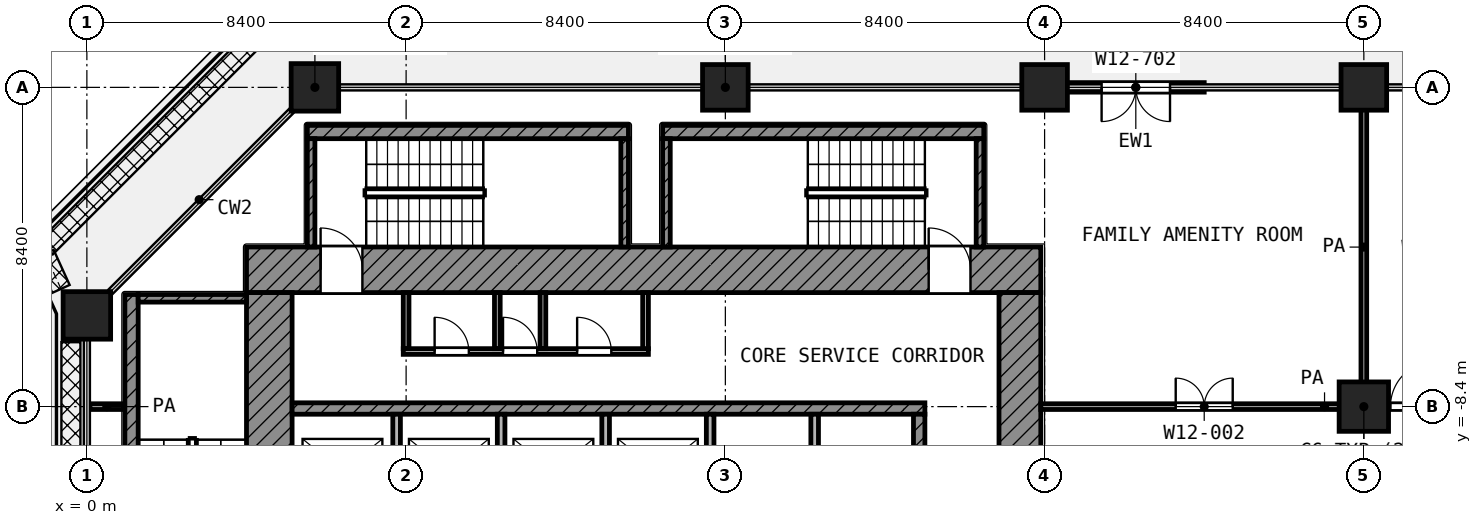
"""IFC4 building model, lengths in metres.
Left out: names, types, materials, properties, quantities, classifications, styles, units other than length and angle.
Written with IfcOpenShell. Run it as: python <this file> out.ifc"""

import sys

from ifc_helpers import new_model, si_unit, direction, frame, frame_2d, origin, origin_2d, place, context, subcontext, project, spatial, rectangle, extrude, element, fill, save


model = new_model("IFC4")
c1 = context("Model", 3, precision=1e-05, world=origin(), true_north=direction((0.0, 1.0)))
c2 = subcontext(c1, "Body", "Model", "MODEL_VIEW")
j1 = project(units=[si_unit("LENGTHUNIT", "METRE"), si_unit("PLANEANGLEUNIT", "RADIAN")], contexts=[c1])
p1 = place(None, origin())
s1 = spatial("IfcSite", under=j1, at=p1, CompositionType="ELEMENT")
p2 = place(p1, origin())
s2 = spatial("IfcBuilding", under=s1, at=p2, CompositionType="ELEMENT")
p3 = place(p2, frame((0.0, 0.0, 77.0)))
s3 = spatial("IfcBuildingStorey", under=s2, at=p3, CompositionType="ELEMENT", Elevation=77.0)
p4 = place(p3, frame((6.0, 0.0, 0.0), z_axis=(0.0, 0.0, 1.0), x_axis=(1.0, 0.0, 0.0)))
e1 = element("IfcColumn", 1, at=p4, inside=s3, PredefinedType="COLUMN", context=c2, shape_type="SweptSolid", body=[
    extrude(rectangle(XDim=1.25, YDim=1.25, at=origin_2d()), origin(), (0.0, 0.0, 1.0), 4.2),
])
for number, where, z_axis, x_axis in (
    (2, (16.8, 0.0, 0.0), (0.0, 0.0, 1.0), (1.0, 0.0, 0.0)),
    (3, (25.2, 0.0, 0.0), (0.0, 0.0, 1.0), (1.0, 0.0, 0.0)),
    (4, (33.6, 0.0, 0.0), (0.0, 0.0, 1.0), (1.0, 0.0, 0.0)),
):
    element("IfcColumn", number, at=place(p3, frame(where, z_axis=z_axis, x_axis=x_axis)), inside=s3, PredefinedType="COLUMN", context=c2, shape_type="SweptSolid", body=[
        extrude(rectangle(XDim=1.2, YDim=1.2, at=origin_2d()), origin(), (0.0, 0.0, 1.0), 4.2),
    ])
p5 = place(p3, frame((0.0, -6.0, 0.0), z_axis=(0.0, 0.0, 1.0), x_axis=(1.0, 0.0, 0.0)))
e5 = element("IfcColumn", 5, at=p5, inside=s3, PredefinedType="COLUMN", context=c2, shape_type="SweptSolid", body=[
    extrude(rectangle(XDim=1.25, YDim=1.25, at=origin_2d()), origin(), (0.0, 0.0, 1.0), 4.2),
])
p6 = place(p3, frame((33.6, -8.4, 0.0), z_axis=(0.0, 0.0, 1.0), x_axis=(1.0, 0.0, 0.0)))
e6 = element("IfcColumn", 6, at=p6, inside=s3, PredefinedType="COLUMN", context=c2, shape_type="SweptSolid", body=[
    extrude(rectangle(XDim=1.3, YDim=1.3, at=origin_2d()), origin(), (0.0, 0.0, 1.0), 4.2),
])
p7 = place(p3, frame((29.4, 0.0, 0.0), z_axis=(0.0, 0.0, 1.0), x_axis=(-1.0, 0.0, 0.0)))
e7 = element("IfcWall", 7, at=p7, inside=s3, PredefinedType="SOLIDWALL", context=c2, shape_type="SweptSolid", body=[
    extrude(rectangle(XDim=3.6, YDim=0.25, at=frame_2d((1.8, 0.0))), origin(), (0.0, 0.0, 1.0), 3.78),
])
p8 = place(p7, frame((0.9, 0.0, 0.0)))
e8 = element("IfcOpeningElement", 8, at=p8, cuts=e7, PredefinedType="OPENING", context=c2, shape_type="SweptSolid", body=[
    extrude(rectangle(XDim=1.8, YDim=2.1, at=frame_2d((0.9, 1.05))), frame((0.0, 0.135, 0.0), z_axis=(0.0, -1.0, 0.0), x_axis=(1.0, 0.0, 0.0)), (0.0, 0.0, 1.0), 0.27),
])
p9 = place(p3, frame((4.2, -4.8, 0.0), z_axis=(0.0, 0.0, 1.0), x_axis=(1.0, 0.0, 0.0)))
e9 = element("IfcWall", 9, at=p9, inside=s3, PredefinedType="SHEAR", context=c2, shape_type="SweptSolid", body=[
    extrude(rectangle(XDim=20.9, YDim=1.2, at=frame_2d((10.45, 0.0))), origin(), (0.0, 0.0, 1.0), 3.9),
])
p10 = place(p9, frame((1.95, 0.0, 0.0)))
e10 = element("IfcOpeningElement", 10, at=p10, cuts=e9, PredefinedType="OPENING", context=c2, shape_type="SweptSolid", body=[
    extrude(rectangle(XDim=1.1, YDim=2.1, at=frame_2d((0.55, 1.05))), frame((0.0, 0.61, 0.0), z_axis=(0.0, -1.0, 0.0), x_axis=(1.0, 0.0, 0.0)), (0.0, 0.0, 1.0), 1.22),
])
p11 = place(p9, frame((17.95, 0.0, 0.0)))
e11 = element("IfcOpeningElement", 11, at=p11, cuts=e9, PredefinedType="OPENING", context=c2, shape_type="SweptSolid", body=[
    extrude(rectangle(XDim=1.1, YDim=2.1, at=frame_2d((0.55, 1.05))), frame((0.0, 0.61, 0.0), z_axis=(0.0, -1.0, 0.0), x_axis=(1.0, 0.0, 0.0)), (0.0, 0.0, 1.0), 1.22),
])
p12 = place(p3, frame((4.8, -25.1, 0.0), z_axis=(0.0, 0.0, 1.0), x_axis=(0.0, 1.0, 0.0)))
e12 = element("IfcWall", 12, at=p12, inside=s3, PredefinedType="SHEAR", context=c2, shape_type="SweptSolid", body=[
    extrude(rectangle(XDim=19.7, YDim=1.2, at=frame_2d((9.85, 0.0))), origin(), (0.0, 0.0, 1.0), 3.9),
])
p13 = place(p12, frame((11.55, 0.0, 0.0)))
e13 = element("IfcOpeningElement", 13, at=p13, cuts=e12, PredefinedType="OPENING", context=c2, shape_type="SweptSolid", body=[
    extrude(rectangle(XDim=1.1, YDim=2.1, at=frame_2d((0.55, 1.05))), frame((0.0, 0.61, 0.0), z_axis=(0.0, -1.0, 0.0), x_axis=(1.0, 0.0, 0.0)), (0.0, 0.0, 1.0), 1.22),
])
p14 = place(p12, frame((2.25, 0.0, 0.0)))
e14 = element("IfcOpeningElement", 14, at=p14, cuts=e12, PredefinedType="OPENING", context=c2, shape_type="SweptSolid", body=[
    extrude(rectangle(XDim=1.1, YDim=2.1, at=frame_2d((0.55, 1.05))), frame((0.0, 0.61, 0.0), z_axis=(0.0, -1.0, 0.0), x_axis=(1.0, 0.0, 0.0)), (0.0, 0.0, 1.0), 1.22),
])
p15 = place(p3, frame((24.55, -24.0, 0.0), z_axis=(0.0, 0.0, 1.0), x_axis=(0.0, 1.0, 0.0)))
e15 = element("IfcWall", 15, at=p15, inside=s3, PredefinedType="SHEAR", context=c2, shape_type="SweptSolid", body=[
    extrude(rectangle(XDim=18.6, YDim=1.1, at=frame_2d((9.3, 0.0))), origin(), (0.0, 0.0, 1.0), 3.9),
])
p16 = place(p15, frame((10.5, 0.0, 0.0)))
e16 = element("IfcOpeningElement", 16, at=p16, cuts=e15, PredefinedType="OPENING", context=c2, shape_type="SweptSolid", body=[
    extrude(rectangle(XDim=1.8, YDim=2.1, at=frame_2d((0.9, 1.05))), frame((0.0, 0.56, 0.0), z_axis=(0.0, -1.0, 0.0), x_axis=(1.0, 0.0, 0.0)), (0.0, 0.0, 1.0), 1.12),
])
p17 = place(p3, frame((5.4, -8.45, 0.0), z_axis=(0.0, 0.0, 1.0), x_axis=(1.0, 0.0, 0.0)))
e17 = element("IfcWall", 17, at=p17, inside=s3, PredefinedType="SHEAR", context=c2, shape_type="SweptSolid", body=[
    extrude(rectangle(XDim=16.65, YDim=0.3, at=frame_2d((8.325, 0.0))), origin(), (0.0, 0.0, 1.0), 3.9),
])
p18 = place(p3, frame((21.9, -10.95, 0.0), z_axis=(0.0, 0.0, 1.0), x_axis=(0.0, 1.0, 0.0)))
e18 = element("IfcWall", 18, at=p18, inside=s3, PredefinedType="SHEAR", context=c2, shape_type="SweptSolid", body=[
    extrude(rectangle(XDim=2.35, YDim=0.3, at=frame_2d((1.175, 0.0))), origin(), (0.0, 0.0, 1.0), 3.9),
])
for number, where, z_axis, x_axis in (
    (19, (8.15, -10.95, 0.0), (0.0, 0.0, 1.0), (0.0, 1.0, 0.0)),
    (20, (10.9, -10.95, 0.0), (0.0, 0.0, 1.0), (0.0, 1.0, 0.0)),
    (21, (13.65, -10.95, 0.0), (0.0, 0.0, 1.0), (0.0, 1.0, 0.0)),
    (22, (16.4, -10.95, 0.0), (0.0, 0.0, 1.0), (0.0, 1.0, 0.0)),
    (23, (19.15, -10.95, 0.0), (0.0, 0.0, 1.0), (0.0, 1.0, 0.0)),
):
    element("IfcWall", number, at=place(p3, frame(where, z_axis=z_axis, x_axis=x_axis)), inside=s3, PredefinedType="PARTITIONING", context=c2, shape_type="SweptSolid", body=[
        extrude(rectangle(XDim=2.35, YDim=0.2, at=frame_2d((1.175, 0.0))), origin(), (0.0, 0.0, 1.0), 3.9),
    ])
p19 = place(p3, frame((8.325, -6.95, 0.0), z_axis=(0.0, 0.0, 1.0), x_axis=(1.0, 0.0, 0.0)))
e24 = element("IfcWall", 24, at=p19, inside=s3, PredefinedType="PARTITIONING", context=c2, shape_type="SweptSolid", body=[
    extrude(rectangle(XDim=6.45, YDim=0.15, at=frame_2d((3.225, 0.0))), origin(), (0.0, 0.0, 1.0), 3.9),
])
p20 = place(p19, frame((0.825, 0.0, 0.0)))
e25 = element("IfcOpeningElement", 25, at=p20, cuts=e24, PredefinedType="OPENING", context=c2, shape_type="SweptSolid", body=[
    extrude(rectangle(XDim=0.9, YDim=2.1, at=frame_2d((0.45, 1.05))), frame((0.0, 0.085, 0.0), z_axis=(0.0, -1.0, 0.0), x_axis=(1.0, 0.0, 0.0)), (0.0, 0.0, 1.0), 0.17),
])
p21 = place(p19, frame((2.625, 0.0, 0.0)))
e26 = element("IfcOpeningElement", 26, at=p21, cuts=e24, PredefinedType="OPENING", context=c2, shape_type="SweptSolid", body=[
    extrude(rectangle(XDim=0.9, YDim=2.1, at=frame_2d((0.45, 1.05))), frame((0.0, 0.085, 0.0), z_axis=(0.0, -1.0, 0.0), x_axis=(1.0, 0.0, 0.0)), (0.0, 0.0, 1.0), 0.17),
])
p22 = place(p19, frame((4.575, 0.0, 0.0)))
e27 = element("IfcOpeningElement", 27, at=p22, cuts=e24, PredefinedType="OPENING", context=c2, shape_type="SweptSolid", body=[
    extrude(rectangle(XDim=0.9, YDim=2.1, at=frame_2d((0.45, 1.05))), frame((0.0, 0.085, 0.0), z_axis=(0.0, -1.0, 0.0), x_axis=(1.0, 0.0, 0.0)), (0.0, 0.0, 1.0), 0.17),
])
for number, where, z_axis, x_axis in (
    (28, (8.4, -6.875, 0.0), (0.0, 0.0, 1.0), (0.0, 1.0, 0.0)),
    (29, (10.8, -6.875, 0.0), (0.0, 0.0, 1.0), (0.0, 1.0, 0.0)),
    (30, (12.0, -6.875, 0.0), (0.0, 0.0, 1.0), (0.0, 1.0, 0.0)),
    (31, (14.7, -6.875, 0.0), (0.0, 0.0, 1.0), (0.0, 1.0, 0.0)),
):
    element("IfcWall", number, at=place(p3, frame(where, z_axis=z_axis, x_axis=x_axis)), inside=s3, PredefinedType="PARTITIONING", context=c2, shape_type="SweptSolid", body=[
        extrude(rectangle(XDim=1.475, YDim=0.15, at=frame_2d((0.738, 0.0))), origin(), (0.0, 0.0, 1.0), 3.9),
    ])
p23 = place(p3, frame((1.175, -13.9, 0.0), z_axis=(0.0, 0.0, 1.0), x_axis=(0.0, 1.0, 0.0)))
e32 = element("IfcWall", 32, at=p23, inside=s3, PredefinedType="SHEAR", context=c2, shape_type="SweptSolid", body=[
    extrude(rectangle(XDim=8.45, YDim=0.35, at=frame_2d((4.225, 0.0))), origin(), (0.0, 0.0, 1.0), 3.9),
])
p24 = place(p3, frame((1.35, -5.55, 0.0), z_axis=(0.0, 0.0, 1.0), x_axis=(1.0, 0.0, 0.0)))
e33 = element("IfcWall", 33, at=p24, inside=s3, PredefinedType="SHEAR", context=c2, shape_type="SweptSolid", body=[
    extrude(rectangle(XDim=2.85, YDim=0.2, at=frame_2d((1.425, 0.0))), origin(), (0.0, 0.0, 1.0), 3.9),
])
p25 = place(p3, frame((5.8, -1.175, 0.0), z_axis=(0.0, 0.0, 1.0), x_axis=(1.0, 0.0, 0.0)))
e34 = element("IfcWall", 34, at=p25, inside=s3, PredefinedType="SHEAR", context=c2, shape_type="SweptSolid", body=[
    extrude(rectangle(XDim=8.45, YDim=0.35, at=frame_2d((4.225, 0.0))), origin(), (0.0, 0.0, 1.0), 3.9),
])
for number, where, z_axis, x_axis in (
    (35, (5.9, -4.2, 0.0), (0.0, 0.0, 1.0), (0.0, 1.0, 0.0)),
    (36, (14.15, -4.2, 0.0), (0.0, 0.0, 1.0), (0.0, 1.0, 0.0)),
):
    element("IfcWall", number, at=place(p3, frame(where, z_axis=z_axis, x_axis=x_axis)), inside=s3, PredefinedType="SHEAR", context=c2, shape_type="SweptSolid", body=[
        extrude(rectangle(XDim=2.85, YDim=0.2, at=frame_2d((1.425, 0.0))), origin(), (0.0, 0.0, 1.0), 3.9),
    ])
p26 = place(p3, frame((15.15, -1.175, 0.0), z_axis=(0.0, 0.0, 1.0), x_axis=(1.0, 0.0, 0.0)))
e37 = element("IfcWall", 37, at=p26, inside=s3, PredefinedType="SHEAR", context=c2, shape_type="SweptSolid", body=[
    extrude(rectangle(XDim=8.45, YDim=0.35, at=frame_2d((4.225, 0.0))), origin(), (0.0, 0.0, 1.0), 3.9),
])
for number, where, z_axis, x_axis in (
    (38, (15.25, -4.2, 0.0), (0.0, 0.0, 1.0), (0.0, 1.0, 0.0)),
    (39, (23.5, -4.2, 0.0), (0.0, 0.0, 1.0), (0.0, 1.0, 0.0)),
):
    element("IfcWall", number, at=place(p3, frame(where, z_axis=z_axis, x_axis=x_axis)), inside=s3, PredefinedType="SHEAR", context=c2, shape_type="SweptSolid", body=[
        extrude(rectangle(XDim=2.85, YDim=0.2, at=frame_2d((1.425, 0.0))), origin(), (0.0, 0.0, 1.0), 3.9),
    ])
p27 = place(p3, frame((0.08, -8.4, 0.0), z_axis=(0.0, 0.0, 1.0), x_axis=(1.0, 0.0, 0.0)))
e40 = element("IfcWall", 40, at=p27, inside=s3, PredefinedType="PARTITIONING", context=c2, shape_type="SweptSolid", body=[
    extrude(rectangle(XDim=0.89, YDim=0.15, at=frame_2d((0.445, 0.0))), origin(), (0.0, 0.0, 1.0), 3.9),
])
p28 = place(p3, frame((25.1, -8.4, 0.0), z_axis=(0.0, 0.0, 1.0), x_axis=(1.0, 0.0, 0.0)))
e41 = element("IfcWall", 41, at=p28, inside=s3, PredefinedType="PARTITIONING", context=c2, shape_type="SweptSolid", body=[
    extrude(rectangle(XDim=14.932, YDim=0.15, at=frame_2d((7.466, 0.0))), origin(), (0.0, 0.0, 1.0), 3.9),
])
p29 = place(p28, frame((3.55, 0.0, 0.0)))
e42 = element("IfcOpeningElement", 42, at=p29, cuts=e41, PredefinedType="OPENING", context=c2, shape_type="SweptSolid", body=[
    extrude(rectangle(XDim=1.5, YDim=2.1, at=frame_2d((0.75, 1.05))), frame((0.0, 0.085, 0.0), z_axis=(0.0, -1.0, 0.0), x_axis=(1.0, 0.0, 0.0)), (0.0, 0.0, 1.0), 0.17),
])
p30 = place(p28, frame((9.2, 0.0, 0.0)))
e43 = element("IfcOpeningElement", 43, at=p30, cuts=e41, PredefinedType="OPENING", context=c2, shape_type="SweptSolid", body=[
    extrude(rectangle(XDim=1.2, YDim=2.1, at=frame_2d((0.6, 1.05))), frame((0.0, 0.085, 0.0), z_axis=(0.0, -1.0, 0.0), x_axis=(1.0, 0.0, 0.0)), (0.0, 0.0, 1.0), 0.17),
])
p31 = place(p3, frame((33.6, -8.325, 0.0), z_axis=(0.0, 0.0, 1.0), x_axis=(0.0, 1.0, 0.0)))
e44 = element("IfcWall", 44, at=p31, inside=s3, PredefinedType="PARTITIONING", context=c2, shape_type="SweptSolid", body=[
    extrude(rectangle(XDim=8.245, YDim=0.15, at=frame_2d((4.123, 0.0))), origin(), (0.0, 0.0, 1.0), 3.9),
])
p32 = place(p8, origin())
e45 = element("IfcDoor", 45, at=p32, inside=s3, OperationType="DOUBLE_DOOR_SINGLE_SWING", PredefinedType="DOOR", context=c2, shape_type="SweptSolid", body=[
    extrude(rectangle(XDim=1.8, YDim=2.1, at=frame_2d((0.9, 1.05))), frame((0.0, 0.025, 0.0), z_axis=(0.0, -1.0, 0.0), x_axis=(1.0, 0.0, 0.0)), (0.0, 0.0, 1.0), 0.05),
])
fill(e8, e45)
p33 = place(p10, origin())
e46 = element("IfcDoor", 46, at=p33, inside=s3, OperationType="SINGLE_SWING_LEFT", PredefinedType="DOOR", context=c2, shape_type="SweptSolid", body=[
    extrude(rectangle(XDim=1.1, YDim=2.1, at=frame_2d((0.55, 1.05))), frame((0.0, 0.025, 0.0), z_axis=(0.0, -1.0, 0.0), x_axis=(1.0, 0.0, 0.0)), (0.0, 0.0, 1.0), 0.05),
])
fill(e10, e46)
p34 = place(p11, origin())
e47 = element("IfcDoor", 47, at=p34, inside=s3, OperationType="SINGLE_SWING_LEFT", PredefinedType="DOOR", context=c2, shape_type="SweptSolid", body=[
    extrude(rectangle(XDim=1.1, YDim=2.1, at=frame_2d((0.55, 1.05))), frame((0.0, 0.025, 0.0), z_axis=(0.0, -1.0, 0.0), x_axis=(1.0, 0.0, 0.0)), (0.0, 0.0, 1.0), 0.05),
])
fill(e11, e47)
p35 = place(p20, origin())
e48 = element("IfcDoor", 48, at=p35, inside=s3, OperationType="SINGLE_SWING_LEFT", PredefinedType="DOOR", context=c2, shape_type="SweptSolid", body=[
    extrude(rectangle(XDim=0.9, YDim=2.1, at=frame_2d((0.45, 1.05))), frame((0.0, 0.025, 0.0), z_axis=(0.0, -1.0, 0.0), x_axis=(1.0, 0.0, 0.0)), (0.0, 0.0, 1.0), 0.05),
])
fill(e25, e48)
p36 = place(p21, origin())
e49 = element("IfcDoor", 49, at=p36, inside=s3, OperationType="SINGLE_SWING_LEFT", PredefinedType="DOOR", context=c2, shape_type="SweptSolid", body=[
    extrude(rectangle(XDim=0.9, YDim=2.1, at=frame_2d((0.45, 1.05))), frame((0.0, 0.025, 0.0), z_axis=(0.0, -1.0, 0.0), x_axis=(1.0, 0.0, 0.0)), (0.0, 0.0, 1.0), 0.05),
])
fill(e26, e49)
p37 = place(p22, origin())
e50 = element("IfcDoor", 50, at=p37, inside=s3, OperationType="SINGLE_SWING_LEFT", PredefinedType="DOOR", context=c2, shape_type="SweptSolid", body=[
    extrude(rectangle(XDim=0.9, YDim=2.1, at=frame_2d((0.45, 1.05))), frame((0.0, 0.025, 0.0), z_axis=(0.0, -1.0, 0.0), x_axis=(1.0, 0.0, 0.0)), (0.0, 0.0, 1.0), 0.05),
])
fill(e27, e50)
p38 = place(p29, origin())
e51 = element("IfcDoor", 51, at=p38, inside=s3, OperationType="DOUBLE_DOOR_SINGLE_SWING", PredefinedType="DOOR", context=c2, shape_type="SweptSolid", body=[
    extrude(rectangle(XDim=1.5, YDim=2.1, at=frame_2d((0.75, 1.05))), frame((0.0, 0.025, 0.0), z_axis=(0.0, -1.0, 0.0), x_axis=(1.0, 0.0, 0.0)), (0.0, 0.0, 1.0), 0.05),
])
fill(e42, e51)
p39 = place(p30, origin())
e52 = element("IfcDoor", 52, at=p39, inside=s3, OperationType="SINGLE_SWING_RIGHT", PredefinedType="DOOR", context=c2, shape_type="SweptSolid", body=[
    extrude(rectangle(XDim=1.2, YDim=2.1, at=frame_2d((0.6, 1.05))), frame((0.0, 0.025, 0.0), z_axis=(0.0, -1.0, 0.0), x_axis=(1.0, 0.0, 0.0)), (0.0, 0.0, 1.0), 0.05),
])
fill(e43, e52)
save(model, sys.argv[1])
